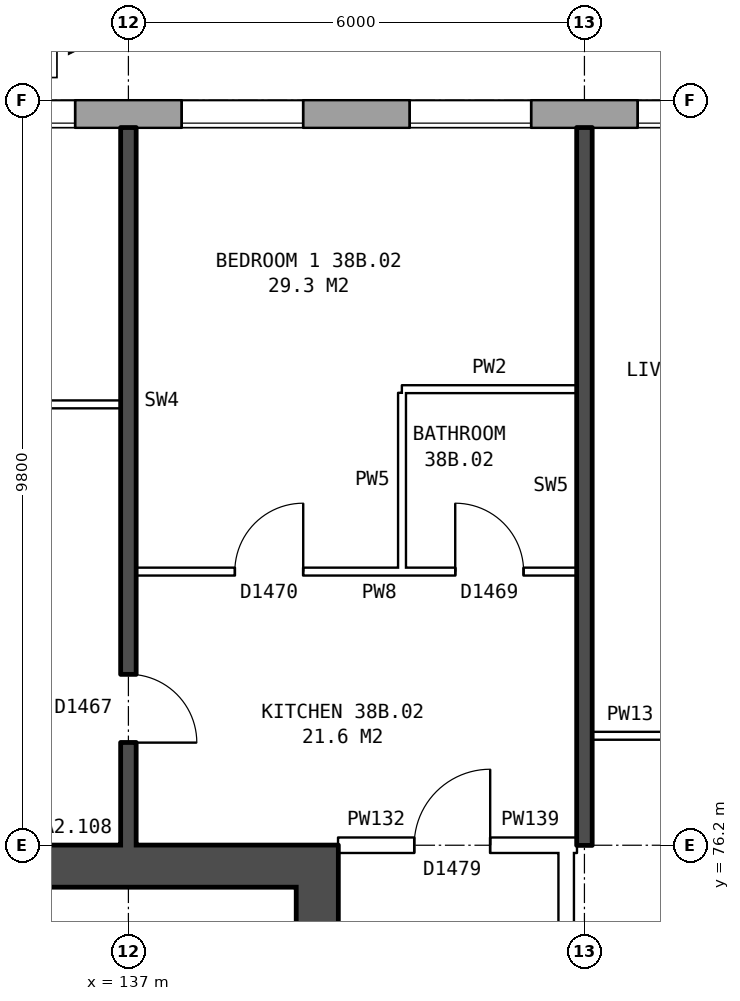
"""IFC4 building model, lengths in metres.
Left out: names, types, materials, properties, quantities, classifications, styles, units other than length and angle.
Written with IfcOpenShell. Run it as: python <this file> out.ifc"""

import sys

from ifc_helpers import new_model, si_unit, direction, frame, frame_2d, origin, place, context, subcontext, project, spatial, rectangle, extrude, element, fill, save


model = new_model("IFC4")
c1 = context("Model", 3, precision=1e-05, world=origin(), true_north=direction((0.0, 1.0)))
c2 = subcontext(c1, "Body", "Model", "MODEL_VIEW")
j1 = project(units=[si_unit("LENGTHUNIT", "METRE"), si_unit("PLANEANGLEUNIT", "RADIAN")], contexts=[c1])
p1 = place(None, origin())
s1 = spatial("IfcSite", under=j1, at=p1, CompositionType="ELEMENT")
p2 = place(p1, origin())
s2 = spatial("IfcBuilding", under=s1, at=p2, CompositionType="ELEMENT")
p3 = place(p2, frame((0.0, 0.0, 136.1)))
s3 = spatial("IfcBuildingStorey", under=s2, at=p3, CompositionType="ELEMENT", Elevation=136.1)
p4 = place(p3, frame((169.675, 85.82, 0.0), z_axis=(0.0, 0.0, 1.0), x_axis=(-1.0, 0.0, 0.0)))
e1 = element("IfcWall", 1, at=p4, inside=s3, PredefinedType="STANDARD", context=c2, shape_type="SweptSolid", body=[
    extrude(rectangle(XDim=35.601, YDim=0.36, at=frame_2d((17.8, 0.0))), origin(), (0.0, 0.0, 1.0), 2.85),
])
p5 = place(p4, frame((0.375, 0.0, 0.8)))
e2 = element("IfcOpeningElement", 2, at=p5, cuts=e1, PredefinedType="OPENING", context=c2, shape_type="SweptSolid", body=[
    extrude(rectangle(XDim=1.6, YDim=1.8, at=frame_2d((0.8, 0.9))), frame((0.0, 0.19, 0.0), z_axis=(0.0, -1.0, 0.0), x_axis=(1.0, 0.0, 0.0)), (0.0, 0.0, 1.0), 0.38),
])
p6 = place(p4, frame((3.375, 0.0, 0.8)))
e3 = element("IfcOpeningElement", 3, at=p6, cuts=e1, PredefinedType="OPENING", context=c2, shape_type="SweptSolid", body=[
    extrude(rectangle(XDim=1.6, YDim=1.8, at=frame_2d((0.8, 0.9))), frame((0.0, 0.19, 0.0), z_axis=(0.0, -1.0, 0.0), x_axis=(1.0, 0.0, 0.0)), (0.0, 0.0, 1.0), 0.38),
])
p7 = place(p4, frame((6.375, 0.0, 0.8)))
e4 = element("IfcOpeningElement", 4, at=p7, cuts=e1, PredefinedType="OPENING", context=c2, shape_type="SweptSolid", body=[
    extrude(rectangle(XDim=1.6, YDim=1.8, at=frame_2d((0.8, 0.9))), frame((0.0, 0.19, 0.0), z_axis=(0.0, -1.0, 0.0), x_axis=(1.0, 0.0, 0.0)), (0.0, 0.0, 1.0), 0.38),
])
p8 = place(p4, frame((9.375, 0.0, 0.8)))
e5 = element("IfcOpeningElement", 5, at=p8, cuts=e1, PredefinedType="OPENING", context=c2, shape_type="SweptSolid", body=[
    extrude(rectangle(XDim=1.6, YDim=1.8, at=frame_2d((0.8, 0.9))), frame((0.0, 0.19, 0.0), z_axis=(0.0, -1.0, 0.0), x_axis=(1.0, 0.0, 0.0)), (0.0, 0.0, 1.0), 0.38),
])
p9 = place(p4, frame((11.275, 0.0, 0.8)))
e6 = element("IfcOpeningElement", 6, at=p9, cuts=e1, PredefinedType="OPENING", context=c2, shape_type="SweptSolid", body=[
    extrude(rectangle(XDim=1.2, YDim=1.8, at=frame_2d((0.6, 0.9))), frame((0.0, 0.19, 0.0), z_axis=(0.0, -1.0, 0.0), x_axis=(1.0, 0.0, 0.0)), (0.0, 0.0, 1.0), 0.38),
])
p10 = place(p4, frame((15.375, 0.0, 0.8)))
e7 = element("IfcOpeningElement", 7, at=p10, cuts=e1, PredefinedType="OPENING", context=c2, shape_type="SweptSolid", body=[
    extrude(rectangle(XDim=1.6, YDim=1.8, at=frame_2d((0.8, 0.9))), frame((0.0, 0.19, 0.0), z_axis=(0.0, -1.0, 0.0), x_axis=(1.0, 0.0, 0.0)), (0.0, 0.0, 1.0), 0.38),
])
p11 = place(p4, frame((18.375, 0.0, 0.8)))
e8 = element("IfcOpeningElement", 8, at=p11, cuts=e1, PredefinedType="OPENING", context=c2, shape_type="SweptSolid", body=[
    extrude(rectangle(XDim=1.6, YDim=1.8, at=frame_2d((0.8, 0.9))), frame((0.0, 0.19, 0.0), z_axis=(0.0, -1.0, 0.0), x_axis=(1.0, 0.0, 0.0)), (0.0, 0.0, 1.0), 0.38),
])
p12 = place(p4, frame((20.875, 0.0, 0.35)))
e9 = element("IfcOpeningElement", 9, at=p12, cuts=e1, PredefinedType="OPENING", context=c2, shape_type="SweptSolid", body=[
    extrude(rectangle(XDim=0.6, YDim=0.9, at=frame_2d((0.3, 0.45))), frame((0.0, 0.19, 0.0), z_axis=(0.0, -1.0, 0.0), x_axis=(1.0, 0.0, 0.0)), (0.0, 0.0, 1.0), 0.38),
])
p13 = place(p4, frame((24.375, 0.0, 0.8)))
e10 = element("IfcOpeningElement", 10, at=p13, cuts=e1, PredefinedType="OPENING", context=c2, shape_type="SweptSolid", body=[
    extrude(rectangle(XDim=1.6, YDim=1.8, at=frame_2d((0.8, 0.9))), frame((0.0, 0.19, 0.0), z_axis=(0.0, -1.0, 0.0), x_axis=(1.0, 0.0, 0.0)), (0.0, 0.0, 1.0), 0.38),
])
p14 = place(p4, frame((27.375, 0.0, 0.8)))
e11 = element("IfcOpeningElement", 11, at=p14, cuts=e1, PredefinedType="OPENING", context=c2, shape_type="SweptSolid", body=[
    extrude(rectangle(XDim=1.6, YDim=1.8, at=frame_2d((0.8, 0.9))), frame((0.0, 0.19, 0.0), z_axis=(0.0, -1.0, 0.0), x_axis=(1.0, 0.0, 0.0)), (0.0, 0.0, 1.0), 0.38),
])
p15 = place(p4, frame((30.375, 0.0, 0.8)))
e12 = element("IfcOpeningElement", 12, at=p15, cuts=e1, PredefinedType="OPENING", context=c2, shape_type="SweptSolid", body=[
    extrude(rectangle(XDim=1.6, YDim=1.8, at=frame_2d((0.8, 0.9))), frame((0.0, 0.19, 0.0), z_axis=(0.0, -1.0, 0.0), x_axis=(1.0, 0.0, 0.0)), (0.0, 0.0, 1.0), 0.38),
])
p16 = place(p4, frame((33.375, 0.0, 0.8)))
e13 = element("IfcOpeningElement", 13, at=p16, cuts=e1, PredefinedType="OPENING", context=c2, shape_type="SweptSolid", body=[
    extrude(rectangle(XDim=1.6, YDim=1.8, at=frame_2d((0.8, 0.9))), frame((0.0, 0.19, 0.0), z_axis=(0.0, -1.0, 0.0), x_axis=(1.0, 0.0, 0.0)), (0.0, 0.0, 1.0), 0.38),
])
p17 = place(p4, frame((12.775, 0.0, 1.6)))
e14 = element("IfcOpeningElement", 14, at=p17, cuts=e1, PredefinedType="OPENING", context=c2, shape_type="SweptSolid", body=[
    extrude(rectangle(XDim=0.6, YDim=0.9, at=frame_2d((0.3, 0.45))), frame((0.0, 0.19, 0.0), z_axis=(0.0, -1.0, 0.0), x_axis=(1.0, 0.0, 0.0)), (0.0, 0.0, 1.0), 0.38),
])
p18 = place(p4, frame((22.425, 0.0, 1.35)))
e15 = element("IfcOpeningElement", 15, at=p18, cuts=e1, PredefinedType="OPENING", context=c2, shape_type="SweptSolid", body=[
    extrude(rectangle(XDim=1.0, YDim=1.2, at=frame_2d((0.5, 0.6))), frame((0.0, 0.19, 0.0), z_axis=(0.0, -1.0, 0.0), x_axis=(1.0, 0.0, 0.0)), (0.0, 0.0, 1.0), 0.38),
])
p19 = place(p3, frame((139.485, 63.8, 0.0), z_axis=(0.0, 0.0, 1.0), x_axis=(0.0, 1.0, 0.0)))
e16 = element("IfcWall", 16, at=p19, inside=s3, PredefinedType="SHEAR", context=c2, shape_type="SweptSolid", body=[
    extrude(rectangle(XDim=12.4, YDim=0.55, at=frame_2d((6.2, 0.0))), origin(), (0.0, 0.0, 1.0), 2.85),
])
p20 = place(p19, frame((1.325, 0.0, 0.0)))
e17 = element("IfcOpeningElement", 17, at=p20, cuts=e16, PredefinedType="OPENING", context=c2, shape_type="SweptSolid", body=[
    extrude(rectangle(XDim=1.1, YDim=2.1, at=frame_2d((0.55, 1.05))), frame((0.0, 0.285, 0.0), z_axis=(0.0, -1.0, 0.0), x_axis=(1.0, 0.0, 0.0)), (0.0, 0.0, 1.0), 0.57),
])
p21 = place(p19, frame((3.6, 0.0, 0.0)))
e18 = element("IfcOpeningElement", 18, at=p21, cuts=e16, PredefinedType="OPENING", context=c2, shape_type="SweptSolid", body=[
    extrude(rectangle(XDim=1.1, YDim=2.1, at=frame_2d((0.55, 1.05))), frame((0.0, 0.285, 0.0), z_axis=(0.0, -1.0, 0.0), x_axis=(1.0, 0.0, 0.0)), (0.0, 0.0, 1.0), 0.57),
])
p22 = place(p19, frame((5.8, 0.0, 0.0)))
e19 = element("IfcOpeningElement", 19, at=p22, cuts=e16, PredefinedType="OPENING", context=c2, shape_type="SweptSolid", body=[
    extrude(rectangle(XDim=1.1, YDim=2.1, at=frame_2d((0.55, 1.05))), frame((0.0, 0.285, 0.0), z_axis=(0.0, -1.0, 0.0), x_axis=(1.0, 0.0, 0.0)), (0.0, 0.0, 1.0), 0.57),
])
p23 = place(p19, frame((9.9, 0.0, 0.0)))
e20 = element("IfcOpeningElement", 20, at=p23, cuts=e16, PredefinedType="OPENING", context=c2, shape_type="SweptSolid", body=[
    extrude(rectangle(XDim=1.1, YDim=2.1, at=frame_2d((0.55, 1.05))), frame((0.0, 0.285, 0.0), z_axis=(0.0, -1.0, 0.0), x_axis=(1.0, 0.0, 0.0)), (0.0, 0.0, 1.0), 0.57),
])
p24 = place(p19, frame((8.125, 0.0, 0.0)))
e21 = element("IfcOpeningElement", 21, at=p24, cuts=e16, PredefinedType="OPENING", context=c2, shape_type="SweptSolid", body=[
    extrude(rectangle(XDim=0.85, YDim=2.1, at=frame_2d((0.425, 1.05))), frame((0.0, 0.285, 0.0), z_axis=(0.0, -1.0, 0.0), x_axis=(1.0, 0.0, 0.0)), (0.0, 0.0, 1.0), 0.57),
])
p25 = place(p3, frame((139.21, 75.925, 0.0), z_axis=(0.0, 0.0, 1.0), x_axis=(-1.0, 0.0, 0.0)))
e22 = element("IfcWall", 22, at=p25, inside=s3, PredefinedType="SHEAR", context=c2, shape_type="SweptSolid", body=[
    extrude(rectangle(XDim=7.3, YDim=0.55, at=frame_2d((3.65, 0.0))), origin(), (0.0, 0.0, 1.0), 2.85),
])
p26 = place(p3, frame((142.76, 63.9, 0.0), z_axis=(0.0, 0.0, 1.0), x_axis=(0.0, 1.0, 0.0)))
e23 = element("IfcWall", 23, at=p26, inside=s3, PredefinedType="PARTITIONING", context=c2, shape_type="SweptSolid", body=[
    extrude(rectangle(XDim=12.2, YDim=0.2, at=frame_2d((6.1, 0.0))), origin(), (0.0, 0.0, 1.0), 2.85),
])
p27 = place(p26, frame((5.1, 0.0, 0.0)))
e24 = element("IfcOpeningElement", 24, at=p27, cuts=e23, PredefinedType="OPENING", context=c2, shape_type="SweptSolid", body=[
    extrude(rectangle(XDim=2.0, YDim=2.1, at=frame_2d((1.0, 1.05))), frame((0.0, 0.11, 0.0), z_axis=(0.0, -1.0, 0.0), x_axis=(1.0, 0.0, 0.0)), (0.0, 0.0, 1.0), 0.22),
])
p28 = place(p3, frame((139.76, 76.2, 0.0), z_axis=(0.0, 0.0, 1.0), x_axis=(1.0, 0.0, 0.0)))
e25 = element("IfcWall", 25, at=p28, inside=s3, PredefinedType="PARTITIONING", context=c2, shape_type="SweptSolid", body=[
    extrude(rectangle(XDim=3.0, YDim=0.2, at=frame_2d((1.5, 0.0))), origin(), (0.0, 0.0, 1.0), 2.85),
])
p29 = place(p28, frame((1.0, 0.0, 0.0)))
e26 = element("IfcOpeningElement", 26, at=p29, cuts=e25, PredefinedType="OPENING", context=c2, shape_type="SweptSolid", body=[
    extrude(rectangle(XDim=1.0, YDim=2.1, at=frame_2d((0.5, 1.05))), frame((0.0, 0.11, 0.0), z_axis=(0.0, -1.0, 0.0), x_axis=(1.0, 0.0, 0.0)), (0.0, 0.0, 1.0), 0.22),
])
p30 = place(p3, frame((142.76, 76.2, 0.0), z_axis=(0.0, 0.0, 1.0), x_axis=(1.0, 0.0, 0.0)))
e27 = element("IfcWall", 27, at=p30, inside=s3, PredefinedType="PARTITIONING", context=c2, shape_type="SweptSolid", body=[
    extrude(rectangle(XDim=0.14, YDim=0.2, at=frame_2d((0.07, 0.0))), origin(), (0.0, 0.0, 1.0), 2.85),
])
p31 = place(p3, frame((143.1, 77.64, 0.0), z_axis=(0.0, 0.0, 1.0), x_axis=(1.0, 0.0, 0.0)))
e28 = element("IfcWall", 28, at=p31, inside=s3, PredefinedType="PARTITIONING", context=c2, shape_type="SweptSolid", body=[
    extrude(rectangle(XDim=2.9, YDim=0.1, at=frame_2d((1.45, 0.0))), origin(), (0.0, 0.0, 1.0), 2.85),
])
p32 = place(p31, frame((1.0, 0.0, 0.0)))
e29 = element("IfcOpeningElement", 29, at=p32, cuts=e28, PredefinedType="OPENING", context=c2, shape_type="SweptSolid", body=[
    extrude(rectangle(XDim=0.9, YDim=2.1, at=frame_2d((0.45, 1.05))), frame((0.0, 0.06, 0.0), z_axis=(0.0, -1.0, 0.0), x_axis=(1.0, 0.0, 0.0)), (0.0, 0.0, 1.0), 0.12),
])
p33 = place(p3, frame((137.1, 79.8, 0.0), z_axis=(0.0, 0.0, 1.0), x_axis=(1.0, 0.0, 0.0)))
e30 = element("IfcWall", 30, at=p33, inside=s3, PredefinedType="PARTITIONING", context=c2, shape_type="SweptSolid", body=[
    extrude(rectangle(XDim=5.8, YDim=0.1, at=frame_2d((2.9, 0.0))), origin(), (0.0, 0.0, 1.0), 2.85),
])
p34 = place(p33, frame((1.3, 0.0, 0.0)))
e31 = element("IfcOpeningElement", 31, at=p34, cuts=e30, PredefinedType="OPENING", context=c2, shape_type="SweptSolid", body=[
    extrude(rectangle(XDim=0.9, YDim=2.1, at=frame_2d((0.45, 1.05))), frame((0.0, 0.06, 0.0), z_axis=(0.0, -1.0, 0.0), x_axis=(1.0, 0.0, 0.0)), (0.0, 0.0, 1.0), 0.12),
])
p35 = place(p33, frame((4.2, 0.0, 0.0)))
e32 = element("IfcOpeningElement", 32, at=p35, cuts=e30, PredefinedType="OPENING", context=c2, shape_type="SweptSolid", body=[
    extrude(rectangle(XDim=0.9, YDim=2.1, at=frame_2d((0.45, 1.05))), frame((0.0, 0.06, 0.0), z_axis=(0.0, -1.0, 0.0), x_axis=(1.0, 0.0, 0.0)), (0.0, 0.0, 1.0), 0.12),
])
p36 = place(p3, frame((131.36, 82.0, 0.0), z_axis=(0.0, 0.0, 1.0), x_axis=(1.0, 0.0, 0.0)))
e33 = element("IfcWall", 33, at=p36, inside=s3, PredefinedType="PARTITIONING", context=c2, shape_type="SweptSolid", body=[
    extrude(rectangle(XDim=5.54, YDim=0.1, at=frame_2d((2.77, 0.0))), origin(), (0.0, 0.0, 1.0), 2.85),
])
p37 = place(p36, frame((2.32, 0.0, 0.0)))
e34 = element("IfcOpeningElement", 34, at=p37, cuts=e33, PredefinedType="OPENING", context=c2, shape_type="SweptSolid", body=[
    extrude(rectangle(XDim=0.9, YDim=2.1, at=frame_2d((0.45, 1.05))), frame((0.0, 0.06, 0.0), z_axis=(0.0, -1.0, 0.0), x_axis=(1.0, 0.0, 0.0)), (0.0, 0.0, 1.0), 0.12),
])
p38 = place(p3, frame((140.6, 82.2, 0.0), z_axis=(0.0, 0.0, 1.0), x_axis=(1.0, 0.0, 0.0)))
e35 = element("IfcWall", 35, at=p38, inside=s3, PredefinedType="PARTITIONING", context=c2, shape_type="SweptSolid", body=[
    extrude(rectangle(XDim=2.3, YDim=0.1, at=frame_2d((1.15, 0.0))), origin(), (0.0, 0.0, 1.0), 2.85),
])
p39 = place(p3, frame((137.0, 76.2, 0.0), z_axis=(0.0, 0.0, 1.0), x_axis=(0.0, 1.0, 0.0)))
e36 = element("IfcWall", 36, at=p39, inside=s3, PredefinedType="SOLIDWALL", context=c2, shape_type="SweptSolid", body=[
    extrude(rectangle(XDim=9.44, YDim=0.2, at=frame_2d((4.72, 0.0))), origin(), (0.0, 0.0, 1.0), 2.85),
])
p40 = place(p39, frame((1.35, 0.0, 0.0)))
e37 = element("IfcOpeningElement", 37, at=p40, cuts=e36, PredefinedType="OPENING", context=c2, shape_type="SweptSolid", body=[
    extrude(rectangle(XDim=0.9, YDim=2.1, at=frame_2d((0.45, 1.05))), frame((0.0, 0.11, 0.0), z_axis=(0.0, -1.0, 0.0), x_axis=(1.0, 0.0, 0.0)), (0.0, 0.0, 1.0), 0.22),
])
p41 = place(p3, frame((140.6, 79.85, 0.0), z_axis=(0.0, 0.0, 1.0), x_axis=(0.0, 1.0, 0.0)))
e38 = element("IfcWall", 38, at=p41, inside=s3, PredefinedType="PARTITIONING", context=c2, shape_type="SweptSolid", body=[
    extrude(rectangle(XDim=2.3, YDim=0.1, at=frame_2d((1.15, 0.0))), origin(), (0.0, 0.0, 1.0), 2.85),
])
p42 = place(p3, frame((143.0, 76.2, 0.0), z_axis=(0.0, 0.0, 1.0), x_axis=(0.0, 1.0, 0.0)))
e39 = element("IfcWall", 39, at=p42, inside=s3, PredefinedType="SOLIDWALL", context=c2, shape_type="SweptSolid", body=[
    extrude(rectangle(XDim=9.44, YDim=0.2, at=frame_2d((4.72, 0.0))), origin(), (0.0, 0.0, 1.0), 2.85),
])
p43 = place(p13, origin())
e40 = element("IfcWindow", 40, at=p43, inside=s3, PartitioningType="SINGLE_PANEL", PredefinedType="WINDOW", context=c2, shape_type="SweptSolid", body=[
    extrude(rectangle(XDim=1.6, YDim=1.8, at=frame_2d((0.8, 0.9))), frame((0.0, 0.15, 0.0), z_axis=(0.0, -1.0, 0.0), x_axis=(1.0, 0.0, 0.0)), (0.0, 0.0, 1.0), 0.06),
])
fill(e10, e40)
p44 = place(p14, origin())
e41 = element("IfcWindow", 41, at=p44, inside=s3, PartitioningType="SINGLE_PANEL", PredefinedType="WINDOW", context=c2, shape_type="SweptSolid", body=[
    extrude(rectangle(XDim=1.6, YDim=1.8, at=frame_2d((0.8, 0.9))), frame((0.0, 0.15, 0.0), z_axis=(0.0, -1.0, 0.0), x_axis=(1.0, 0.0, 0.0)), (0.0, 0.0, 1.0), 0.06),
])
fill(e11, e41)
p45 = place(p15, origin())
e42 = element("IfcWindow", 42, at=p45, inside=s3, PartitioningType="SINGLE_PANEL", PredefinedType="WINDOW", context=c2, shape_type="SweptSolid", body=[
    extrude(rectangle(XDim=1.6, YDim=1.8, at=frame_2d((0.8, 0.9))), frame((0.0, 0.15, 0.0), z_axis=(0.0, -1.0, 0.0), x_axis=(1.0, 0.0, 0.0)), (0.0, 0.0, 1.0), 0.06),
])
fill(e12, e42)
p46 = place(p16, origin())
e43 = element("IfcWindow", 43, at=p46, inside=s3, PartitioningType="SINGLE_PANEL", PredefinedType="WINDOW", context=c2, shape_type="SweptSolid", body=[
    extrude(rectangle(XDim=1.6, YDim=1.8, at=frame_2d((0.8, 0.9))), frame((0.0, 0.15, 0.0), z_axis=(0.0, -1.0, 0.0), x_axis=(1.0, 0.0, 0.0)), (0.0, 0.0, 1.0), 0.06),
])
fill(e13, e43)
p47 = place(p34, origin())
e44 = element("IfcDoor", 44, at=p47, inside=s3, OperationType="SINGLE_SWING_RIGHT", PredefinedType="DOOR", context=c2, shape_type="SweptSolid", body=[
    extrude(rectangle(XDim=0.9, YDim=2.1, at=frame_2d((0.45, 1.05))), frame((0.0, 0.025, 0.0), z_axis=(0.0, -1.0, 0.0), x_axis=(1.0, 0.0, 0.0)), (0.0, 0.0, 1.0), 0.05),
])
fill(e31, e44)
p48 = place(p29, origin())
e45 = element("IfcDoor", 45, at=p48, inside=s3, OperationType="SINGLE_SWING_RIGHT", PredefinedType="DOOR", context=c2, shape_type="SweptSolid", body=[
    extrude(rectangle(XDim=1.0, YDim=2.1, at=frame_2d((0.5, 1.05))), frame((0.0, 0.025, 0.0), z_axis=(0.0, -1.0, 0.0), x_axis=(1.0, 0.0, 0.0)), (0.0, 0.0, 1.0), 0.05),
])
fill(e26, e45)
p49 = place(p40, frame((0.9, 0.0, 0.0), z_axis=(0.0, 0.0, 1.0), x_axis=(-1.0, 0.0, 0.0)))
e46 = element("IfcDoor", 46, at=p49, inside=s3, OperationType="SINGLE_SWING_RIGHT", PredefinedType="DOOR", context=c2, shape_type="SweptSolid", body=[
    extrude(rectangle(XDim=0.9, YDim=2.1, at=frame_2d((0.45, 1.05))), frame((0.0, 0.025, 0.0), z_axis=(0.0, -1.0, 0.0), x_axis=(1.0, 0.0, 0.0)), (0.0, 0.0, 1.0), 0.05),
])
fill(e37, e46)
p50 = place(p35, origin())
e47 = element("IfcDoor", 47, at=p50, inside=s3, OperationType="SINGLE_SWING_LEFT", PredefinedType="DOOR", context=c2, shape_type="SweptSolid", body=[
    extrude(rectangle(XDim=0.9, YDim=2.1, at=frame_2d((0.45, 1.05))), frame((0.0, 0.025, 0.0), z_axis=(0.0, -1.0, 0.0), x_axis=(1.0, 0.0, 0.0)), (0.0, 0.0, 1.0), 0.05),
])
fill(e32, e47)
save(model, sys.argv[1])
